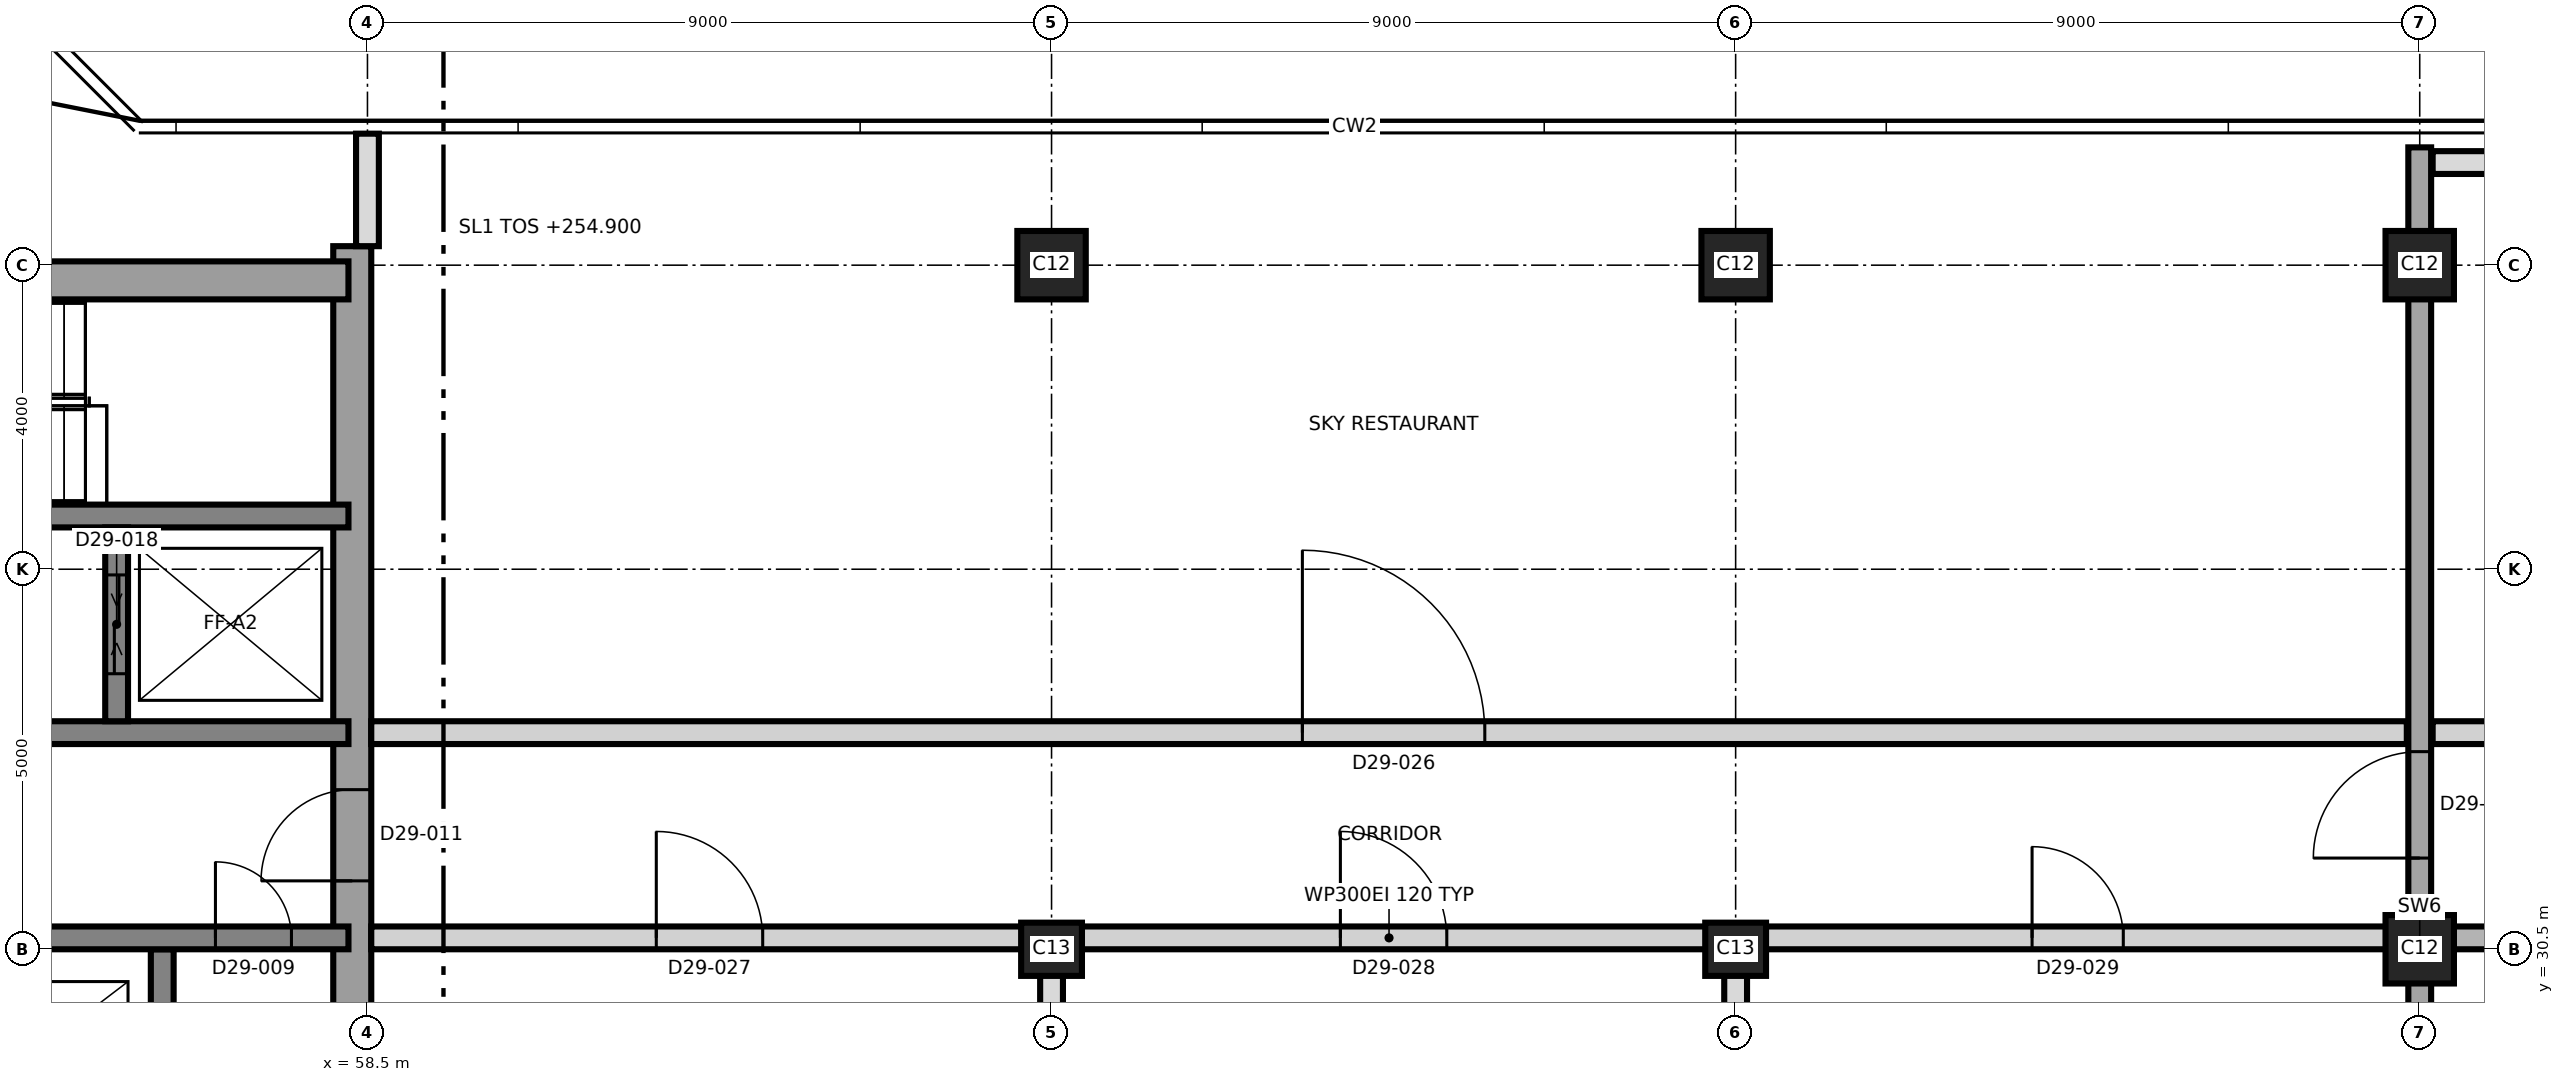
"""IFC4 building model, lengths in metres.
Left out: names, types, materials, properties, quantities, classifications, styles, units other than length and angle.
Written with IfcOpenShell. Run it as: python <this file> out.ifc"""

import sys

from ifc_helpers import new_model, si_unit, direction, frame, frame_2d, origin, origin_2d, place, context, subcontext, project, spatial, rectangle, extrude, element, fill, save


model = new_model("IFC4")
c1 = context("Model", 3, precision=1e-05, world=origin(), true_north=direction((0.0, 1.0)))
c2 = subcontext(c1, "Body", "Model", "MODEL_VIEW")
j1 = project(units=[si_unit("LENGTHUNIT", "METRE"), si_unit("PLANEANGLEUNIT", "RADIAN")], contexts=[c1])
p1 = place(None, origin())
s1 = spatial("IfcSite", under=j1, at=p1, CompositionType="ELEMENT")
p2 = place(p1, origin())
s2 = spatial("IfcBuilding", under=s1, at=p2, CompositionType="ELEMENT")
p3 = place(p2, frame((0.0, 0.0, 254.9)))
s3 = spatial("IfcBuildingStorey", under=s2, at=p3, CompositionType="ELEMENT", Elevation=254.9)
p4 = place(p3, frame((58.3, 21.25, 0.0), z_axis=(0.0, 0.0, 1.0), x_axis=(0.0, 1.0, 0.0)))
e1 = element("IfcWall", 1, at=p4, inside=s3, PredefinedType="SHEAR", context=c2, shape_type="SweptSolid", body=[
    extrude(rectangle(XDim=18.5, YDim=0.5, at=frame_2d((9.25, 0.0))), origin(), (0.0, 0.0, 1.0), 6.0),
])
p5 = place(p4, frame((10.15, 0.0, 0.0)))
e2 = element("IfcOpeningElement", 2, at=p5, cuts=e1, PredefinedType="OPENING", context=c2, shape_type="SweptSolid", body=[
    extrude(rectangle(XDim=1.2, YDim=2.1, at=frame_2d((0.6, 1.05))), frame((0.0, 0.26, 0.0), z_axis=(0.0, -1.0, 0.0), x_axis=(1.0, 0.0, 0.0)), (0.0, 0.0, 1.0), 0.52),
])
p6 = place(p3, frame((31.25, 39.3, 0.0), z_axis=(0.0, 0.0, 1.0), x_axis=(1.0, 0.0, 0.0)))
e3 = element("IfcWall", 3, at=p6, inside=s3, PredefinedType="SHEAR", context=c2, shape_type="SweptSolid", body=[
    extrude(rectangle(XDim=27.0, YDim=0.5, at=frame_2d((13.5, 0.0))), origin(), (0.0, 0.0, 1.0), 6.0),
])
p7 = place(p6, frame((10.45, 0.0, 0.0)))
e4 = element("IfcOpeningElement", 4, at=p7, cuts=e3, PredefinedType="OPENING", context=c2, shape_type="SweptSolid", body=[
    extrude(rectangle(XDim=1.2, YDim=2.1, at=frame_2d((0.6, 1.05))), frame((0.0, 0.26, 0.0), z_axis=(0.0, -1.0, 0.0), x_axis=(1.0, 0.0, 0.0)), (0.0, 0.0, 1.0), 0.52),
])
p8 = place(p3, frame((55.8, 21.75, 0.0), z_axis=(0.0, 0.0, 1.0), x_axis=(0.0, 1.0, 0.0)))
e5 = element("IfcWall", 5, at=p8, inside=s3, PredefinedType="SHEAR", context=c2, shape_type="SweptSolid", body=[
    extrude(rectangle(XDim=8.75, YDim=0.3, at=frame_2d((4.375, 0.0))), origin(), (0.0, 0.0, 1.0), 6.0),
])
p9 = place(p3, frame((31.75, 30.65, 0.0), z_axis=(0.0, 0.0, 1.0), x_axis=(1.0, 0.0, 0.0)))
e6 = element("IfcWall", 6, at=p9, inside=s3, PredefinedType="SHEAR", context=c2, shape_type="SweptSolid", body=[
    extrude(rectangle(XDim=26.5, YDim=0.3, at=frame_2d((13.25, 0.0))), origin(), (0.0, 0.0, 1.0), 6.0),
])
p10 = place(p9, frame((24.75, 0.0, 0.0)))
e7 = element("IfcOpeningElement", 7, at=p10, cuts=e6, PredefinedType="OPENING", context=c2, shape_type="SweptSolid", body=[
    extrude(rectangle(XDim=1.0, YDim=2.1, at=frame_2d((0.5, 1.05))), frame((0.0, 0.16, 0.0), z_axis=(0.0, -1.0, 0.0), x_axis=(1.0, 0.0, 0.0)), (0.0, 0.0, 1.0), 0.32),
])
p11 = place(p9, frame((11.55, 0.0, 0.0)))
e8 = element("IfcOpeningElement", 8, at=p11, cuts=e6, PredefinedType="OPENING", context=c2, shape_type="SweptSolid", body=[
    extrude(rectangle(XDim=1.0, YDim=2.1, at=frame_2d((0.5, 1.05))), frame((0.0, 0.16, 0.0), z_axis=(0.0, -1.0, 0.0), x_axis=(1.0, 0.0, 0.0)), (0.0, 0.0, 1.0), 0.32),
])
p12 = place(p3, frame((31.75, 33.35, 0.0), z_axis=(0.0, 0.0, 1.0), x_axis=(1.0, 0.0, 0.0)))
e9 = element("IfcWall", 9, at=p12, inside=s3, PredefinedType="SHEAR", context=c2, shape_type="SweptSolid", body=[
    extrude(rectangle(XDim=26.5, YDim=0.3, at=frame_2d((13.25, 0.0))), origin(), (0.0, 0.0, 1.0), 6.0),
])
p13 = place(p12, frame((13.9, 0.0, 0.0)))
e10 = element("IfcOpeningElement", 10, at=p13, cuts=e9, PredefinedType="OPENING", context=c2, shape_type="SweptSolid", body=[
    extrude(rectangle(XDim=1.4, YDim=2.1, at=frame_2d((0.7, 1.05))), frame((0.0, 0.16, 0.0), z_axis=(0.0, -1.0, 0.0), x_axis=(1.0, 0.0, 0.0)), (0.0, 0.0, 1.0), 0.32),
])
p14 = place(p12, frame((5.375, 0.0, 0.0)))
e11 = element("IfcOpeningElement", 11, at=p14, cuts=e9, PredefinedType="OPENING", context=c2, shape_type="SweptSolid", body=[
    extrude(rectangle(XDim=1.2, YDim=2.1, at=frame_2d((0.6, 1.05))), frame((0.0, 0.16, 0.0), z_axis=(0.0, -1.0, 0.0), x_axis=(1.0, 0.0, 0.0)), (0.0, 0.0, 1.0), 0.32),
])
p15 = place(p12, frame((19.925, 0.0, 0.0)))
e12 = element("IfcOpeningElement", 12, at=p15, cuts=e9, PredefinedType="OPENING", context=c2, shape_type="SweptSolid", body=[
    extrude(rectangle(XDim=1.2, YDim=2.1, at=frame_2d((0.6, 1.05))), frame((0.0, 0.16, 0.0), z_axis=(0.0, -1.0, 0.0), x_axis=(1.0, 0.0, 0.0)), (0.0, 0.0, 1.0), 0.32),
])
p16 = place(p3, frame((43.5, 36.2, 0.0), z_axis=(0.0, 0.0, 1.0), x_axis=(1.0, 0.0, 0.0)))
e13 = element("IfcWall", 13, at=p16, inside=s3, PredefinedType="SHEAR", context=c2, shape_type="SweptSolid", body=[
    extrude(rectangle(XDim=14.75, YDim=0.3, at=frame_2d((7.375, 0.0))), origin(), (0.0, 0.0, 1.0), 6.0),
])
p17 = place(p16, frame((6.9, 0.0, 0.0)))
e14 = element("IfcOpeningElement", 14, at=p17, cuts=e13, PredefinedType="OPENING", context=c2, shape_type="SweptSolid", body=[
    extrude(rectangle(XDim=1.2, YDim=2.1, at=frame_2d((0.6, 1.05))), frame((0.0, 0.16, 0.0), z_axis=(0.0, -1.0, 0.0), x_axis=(1.0, 0.0, 0.0)), (0.0, 0.0, 1.0), 0.32),
])
p18 = place(p16, frame((0.7, 0.0, 0.0)))
e15 = element("IfcOpeningElement", 15, at=p18, cuts=e13, PredefinedType="OPENING", context=c2, shape_type="SweptSolid", body=[
    extrude(rectangle(XDim=1.3, YDim=2.4, at=frame_2d((0.65, 1.2))), frame((0.0, 0.16, 0.0), z_axis=(0.0, -1.0, 0.0), x_axis=(1.0, 0.0, 0.0)), (0.0, 0.0, 1.0), 0.32),
])
p19 = place(p16, frame((3.7, 0.0, 0.0)))
e16 = element("IfcOpeningElement", 16, at=p19, cuts=e13, PredefinedType="OPENING", context=c2, shape_type="SweptSolid", body=[
    extrude(rectangle(XDim=1.3, YDim=2.4, at=frame_2d((0.65, 1.2))), frame((0.0, 0.16, 0.0), z_axis=(0.0, -1.0, 0.0), x_axis=(1.0, 0.0, 0.0)), (0.0, 0.0, 1.0), 0.32),
])
p20 = place(p3, frame((55.2, 33.5, 0.0), z_axis=(0.0, 0.0, 1.0), x_axis=(0.0, 1.0, 0.0)))
e17 = element("IfcWall", 17, at=p20, inside=s3, PredefinedType="SHEAR", context=c2, shape_type="SweptSolid", body=[
    extrude(rectangle(XDim=2.55, YDim=0.3, at=frame_2d((1.275, 0.0))), origin(), (0.0, 0.0, 1.0), 6.0),
])
p21 = place(p20, frame((0.625, 0.0, 0.0)))
e18 = element("IfcOpeningElement", 18, at=p21, cuts=e17, PredefinedType="OPENING", context=c2, shape_type="SweptSolid", body=[
    extrude(rectangle(XDim=1.3, YDim=2.4, at=frame_2d((0.65, 1.2))), frame((0.0, 0.16, 0.0), z_axis=(0.0, -1.0, 0.0), x_axis=(1.0, 0.0, 0.0)), (0.0, 0.0, 1.0), 0.32),
])
for number, where, z_axis, x_axis in (
    (19, (67.5, 30.5, 0.0), (0.0, 0.0, 1.0), (1.0, 0.0, 0.0)),
    (20, (76.5, 30.5, 0.0), (0.0, 0.0, 1.0), (1.0, 0.0, 0.0)),
):
    element("IfcColumn", number, at=place(p3, frame(where, z_axis=z_axis, x_axis=x_axis)), inside=s3, PredefinedType="COLUMN", context=c2, shape_type="SweptSolid", body=[
        extrude(rectangle(XDim=0.8, YDim=0.7, at=origin_2d()), origin(), (0.0, 0.0, 1.0), 6.0),
    ])
for number, where, z_axis, x_axis in (
    (21, (85.5, 30.5, 0.0), (0.0, 0.0, 1.0), (1.0, 0.0, 0.0)),
    (22, (67.5, 39.5, 0.0), (0.0, 0.0, 1.0), (1.0, 0.0, 0.0)),
    (23, (76.5, 39.5, 0.0), (0.0, 0.0, 1.0), (1.0, 0.0, 0.0)),
    (24, (85.5, 39.5, 0.0), (0.0, 0.0, 1.0), (1.0, 0.0, 0.0)),
):
    element("IfcColumn", number, at=place(p3, frame(where, z_axis=z_axis, x_axis=x_axis)), inside=s3, PredefinedType="COLUMN", context=c2, shape_type="SweptSolid", body=[
        extrude(rectangle(XDim=0.9, YDim=0.9, at=origin_2d()), origin(), (0.0, 0.0, 1.0), 6.0),
    ])
p22 = place(p3, frame((85.5, 19.95, 0.0), z_axis=(0.0, 0.0, 1.0), x_axis=(0.0, 1.0, 0.0)))
e25 = element("IfcWall", 25, at=p22, inside=s3, PredefinedType="SHEAR", context=c2, shape_type="SweptSolid", body=[
    extrude(rectangle(XDim=21.1, YDim=0.3, at=frame_2d((10.55, 0.0))), origin(), (0.0, 0.0, 1.0), 6.0),
])
p23 = place(p22, frame((11.75, 0.0, 0.0)))
e26 = element("IfcOpeningElement", 26, at=p23, cuts=e25, PredefinedType="OPENING", context=c2, shape_type="SweptSolid", body=[
    extrude(rectangle(XDim=1.4, YDim=2.1, at=frame_2d((0.7, 1.05))), frame((0.0, 0.16, 0.0), z_axis=(0.0, -1.0, 0.0), x_axis=(1.0, 0.0, 0.0)), (0.0, 0.0, 1.0), 0.32),
])
p24 = place(p3, frame((58.55, 30.65, 0.0), z_axis=(0.0, 0.0, 1.0), x_axis=(1.0, 0.0, 0.0)))
e27 = element("IfcWall", 27, at=p24, inside=s3, PredefinedType="PARTITIONING", context=c2, shape_type="SweptSolid", body=[
    extrude(rectangle(XDim=26.78, YDim=0.3, at=frame_2d((13.39, 0.0))), origin(), (0.0, 0.0, 1.0), 5.7),
])
p25 = place(p24, frame((3.75, 0.0, 0.0)))
e28 = element("IfcOpeningElement", 28, at=p25, cuts=e27, PredefinedType="OPENING", context=c2, shape_type="SweptSolid", body=[
    extrude(rectangle(XDim=1.4, YDim=2.1, at=frame_2d((0.7, 1.05))), frame((0.0, 0.16, 0.0), z_axis=(0.0, -1.0, 0.0), x_axis=(1.0, 0.0, 0.0)), (0.0, 0.0, 1.0), 0.32),
])
p26 = place(p24, frame((12.75, 0.0, 0.0)))
e29 = element("IfcOpeningElement", 29, at=p26, cuts=e27, PredefinedType="OPENING", context=c2, shape_type="SweptSolid", body=[
    extrude(rectangle(XDim=1.4, YDim=2.1, at=frame_2d((0.7, 1.05))), frame((0.0, 0.16, 0.0), z_axis=(0.0, -1.0, 0.0), x_axis=(1.0, 0.0, 0.0)), (0.0, 0.0, 1.0), 0.32),
])
p27 = place(p24, frame((21.85, 0.0, 0.0)))
e30 = element("IfcOpeningElement", 30, at=p27, cuts=e27, PredefinedType="OPENING", context=c2, shape_type="SweptSolid", body=[
    extrude(rectangle(XDim=1.2, YDim=2.1, at=frame_2d((0.6, 1.05))), frame((0.0, 0.16, 0.0), z_axis=(0.0, -1.0, 0.0), x_axis=(1.0, 0.0, 0.0)), (0.0, 0.0, 1.0), 0.32),
])
p28 = place(p3, frame((85.67, 30.65, 0.0), z_axis=(0.0, 0.0, 1.0), x_axis=(1.0, 0.0, 0.0)))
e31 = element("IfcWall", 31, at=p28, inside=s3, PredefinedType="SHEAR", context=c2, shape_type="SweptSolid", body=[
    extrude(rectangle(XDim=9.58, YDim=0.3, at=frame_2d((4.79, 0.0))), origin(), (0.0, 0.0, 1.0), 5.7),
])
p29 = place(p28, frame((2.08, 0.0, 0.0)))
e32 = element("IfcOpeningElement", 32, at=p29, cuts=e31, PredefinedType="OPENING", context=c2, shape_type="SweptSolid", body=[
    extrude(rectangle(XDim=1.2, YDim=2.1, at=frame_2d((0.6, 1.05))), frame((0.0, 0.16, 0.0), z_axis=(0.0, -1.0, 0.0), x_axis=(1.0, 0.0, 0.0)), (0.0, 0.0, 1.0), 0.32),
])
p30 = place(p28, frame((5.63, 0.0, 0.0)))
e33 = element("IfcOpeningElement", 33, at=p30, cuts=e31, PredefinedType="OPENING", context=c2, shape_type="SweptSolid", body=[
    extrude(rectangle(XDim=1.0, YDim=2.1, at=frame_2d((0.5, 1.05))), frame((0.0, 0.16, 0.0), z_axis=(0.0, -1.0, 0.0), x_axis=(1.0, 0.0, 0.0)), (0.0, 0.0, 1.0), 0.32),
])
p31 = place(p3, frame((58.55, 33.35, 0.0), z_axis=(0.0, 0.0, 1.0), x_axis=(1.0, 0.0, 0.0)))
e34 = element("IfcWall", 34, at=p31, inside=s3, PredefinedType="PARTITIONING", context=c2, shape_type="SweptSolid", body=[
    extrude(rectangle(XDim=26.78, YDim=0.3, at=frame_2d((13.39, 0.0))), origin(), (0.0, 0.0, 1.0), 5.7),
])
p32 = place(p31, frame((12.25, 0.0, 0.0)))
e35 = element("IfcOpeningElement", 35, at=p32, cuts=e34, PredefinedType="OPENING", context=c2, shape_type="SweptSolid", body=[
    extrude(rectangle(XDim=2.4, YDim=2.4, at=frame_2d((1.2, 1.2))), frame((0.0, 0.16, 0.0), z_axis=(0.0, -1.0, 0.0), x_axis=(1.0, 0.0, 0.0)), (0.0, 0.0, 1.0), 0.32),
])
p33 = place(p3, frame((85.67, 33.35, 0.0), z_axis=(0.0, 0.0, 1.0), x_axis=(1.0, 0.0, 0.0)))
e36 = element("IfcWall", 36, at=p33, inside=s3, PredefinedType="PARTITIONING", context=c2, shape_type="SweptSolid", body=[
    extrude(rectangle(XDim=9.58, YDim=0.3, at=frame_2d((4.79, 0.0))), origin(), (0.0, 0.0, 1.0), 5.7),
])
p34 = place(p33, frame((1.83, 0.0, 0.0)))
e37 = element("IfcOpeningElement", 37, at=p34, cuts=e36, PredefinedType="OPENING", context=c2, shape_type="SweptSolid", body=[
    extrude(rectangle(XDim=1.0, YDim=2.1, at=frame_2d((0.5, 1.05))), frame((0.0, 0.16, 0.0), z_axis=(0.0, -1.0, 0.0), x_axis=(1.0, 0.0, 0.0)), (0.0, 0.0, 1.0), 0.32),
])
p35 = place(p33, frame((5.63, 0.0, 0.0)))
e38 = element("IfcOpeningElement", 38, at=p35, cuts=e36, PredefinedType="OPENING", context=c2, shape_type="SweptSolid", body=[
    extrude(rectangle(XDim=1.0, YDim=2.1, at=frame_2d((0.5, 1.05))), frame((0.0, 0.16, 0.0), z_axis=(0.0, -1.0, 0.0), x_axis=(1.0, 0.0, 0.0)), (0.0, 0.0, 1.0), 0.32),
])
p36 = place(p3, frame((85.67, 40.85, 0.0), z_axis=(0.0, 0.0, 1.0), x_axis=(1.0, 0.0, 0.0)))
e39 = element("IfcWall", 39, at=p36, inside=s3, PredefinedType="PARTITIONING", context=c2, shape_type="SweptSolid", body=[
    extrude(rectangle(XDim=4.432, YDim=0.3, at=frame_2d((2.216, 0.0))), origin(), (0.0, 0.0, 1.0), 5.65),
])
p37 = place(p3, frame((58.5, 39.75, 0.0), z_axis=(0.0, 0.0, 1.0), x_axis=(0.0, 1.0, 0.0)))
e40 = element("IfcWall", 40, at=p37, inside=s3, PredefinedType="PARTITIONING", context=c2, shape_type="SweptSolid", body=[
    extrude(rectangle(XDim=1.48, YDim=0.3, at=frame_2d((0.74, 0.0))), origin(), (0.0, 0.0, 1.0), 5.65),
])
for number, where, z_axis, x_axis in (
    (41, (67.5, 19.77, 0.0), (0.0, 0.0, 1.0), (0.0, 1.0, 0.0)),
    (42, (76.5, 19.77, 0.0), (0.0, 0.0, 1.0), (0.0, 1.0, 0.0)),
):
    element("IfcWall", number, at=place(p3, frame(where, z_axis=z_axis, x_axis=x_axis)), inside=s3, PredefinedType="PARTITIONING", context=c2, shape_type="SweptSolid", body=[
        extrude(rectangle(XDim=10.88, YDim=0.3, at=frame_2d((5.44, 0.0))), origin(), (0.0, 0.0, 1.0), 5.65),
    ])
p38 = place(p10, origin())
e43 = element("IfcDoor", 43, at=p38, inside=s3, OperationType="SINGLE_SWING_LEFT", PredefinedType="DOOR", context=c2, shape_type="SweptSolid", body=[
    extrude(rectangle(XDim=1.0, YDim=2.1, at=frame_2d((0.5, 1.05))), frame((0.0, 0.025, 0.0), z_axis=(0.0, -1.0, 0.0), x_axis=(1.0, 0.0, 0.0)), (0.0, 0.0, 1.0), 0.05),
])
fill(e7, e43)
p39 = place(p5, origin())
e44 = element("IfcDoor", 44, at=p39, inside=s3, OperationType="SINGLE_SWING_LEFT", PredefinedType="DOOR", context=c2, shape_type="SweptSolid", body=[
    extrude(rectangle(XDim=1.2, YDim=2.1, at=frame_2d((0.6, 1.05))), frame((0.0, 0.025, 0.0), z_axis=(0.0, -1.0, 0.0), x_axis=(1.0, 0.0, 0.0)), (0.0, 0.0, 1.0), 0.05),
])
fill(e2, e44)
p40 = place(p21, origin())
e45 = element("IfcDoor", 45, at=p40, inside=s3, OperationType="SLIDING_TO_LEFT", PredefinedType="DOOR", context=c2, shape_type="SweptSolid", body=[
    extrude(rectangle(XDim=1.3, YDim=2.4, at=frame_2d((0.65, 1.2))), frame((0.0, 0.025, 0.0), z_axis=(0.0, -1.0, 0.0), x_axis=(1.0, 0.0, 0.0)), (0.0, 0.0, 1.0), 0.05),
])
fill(e18, e45)
p41 = place(p32, origin())
e46 = element("IfcDoor", 46, at=p41, inside=s3, OperationType="SINGLE_SWING_LEFT", PredefinedType="DOOR", context=c2, shape_type="SweptSolid", body=[
    extrude(rectangle(XDim=2.4, YDim=2.4, at=frame_2d((1.2, 1.2))), frame((0.0, 0.025, 0.0), z_axis=(0.0, -1.0, 0.0), x_axis=(1.0, 0.0, 0.0)), (0.0, 0.0, 1.0), 0.05),
])
fill(e35, e46)
p42 = place(p25, origin())
e47 = element("IfcDoor", 47, at=p42, inside=s3, OperationType="SINGLE_SWING_LEFT", PredefinedType="DOOR", context=c2, shape_type="SweptSolid", body=[
    extrude(rectangle(XDim=1.4, YDim=2.1, at=frame_2d((0.7, 1.05))), frame((0.0, 0.025, 0.0), z_axis=(0.0, -1.0, 0.0), x_axis=(1.0, 0.0, 0.0)), (0.0, 0.0, 1.0), 0.05),
])
fill(e28, e47)
p43 = place(p26, origin())
e48 = element("IfcDoor", 48, at=p43, inside=s3, OperationType="SINGLE_SWING_LEFT", PredefinedType="DOOR", context=c2, shape_type="SweptSolid", body=[
    extrude(rectangle(XDim=1.4, YDim=2.1, at=frame_2d((0.7, 1.05))), frame((0.0, 0.025, 0.0), z_axis=(0.0, -1.0, 0.0), x_axis=(1.0, 0.0, 0.0)), (0.0, 0.0, 1.0), 0.05),
])
fill(e29, e48)
p44 = place(p27, origin())
e49 = element("IfcDoor", 49, at=p44, inside=s3, OperationType="SINGLE_SWING_LEFT", PredefinedType="DOOR", context=c2, shape_type="SweptSolid", body=[
    extrude(rectangle(XDim=1.2, YDim=2.1, at=frame_2d((0.6, 1.05))), frame((0.0, 0.025, 0.0), z_axis=(0.0, -1.0, 0.0), x_axis=(1.0, 0.0, 0.0)), (0.0, 0.0, 1.0), 0.05),
])
fill(e30, e49)
p45 = place(p23, origin())
e50 = element("IfcDoor", 50, at=p45, inside=s3, OperationType="SINGLE_SWING_RIGHT", PredefinedType="DOOR", context=c2, shape_type="SweptSolid", body=[
    extrude(rectangle(XDim=1.4, YDim=2.1, at=frame_2d((0.7, 1.05))), frame((0.0, 0.025, 0.0), z_axis=(0.0, -1.0, 0.0), x_axis=(1.0, 0.0, 0.0)), (0.0, 0.0, 1.0), 0.05),
])
fill(e26, e50)
save(model, sys.argv[1])
